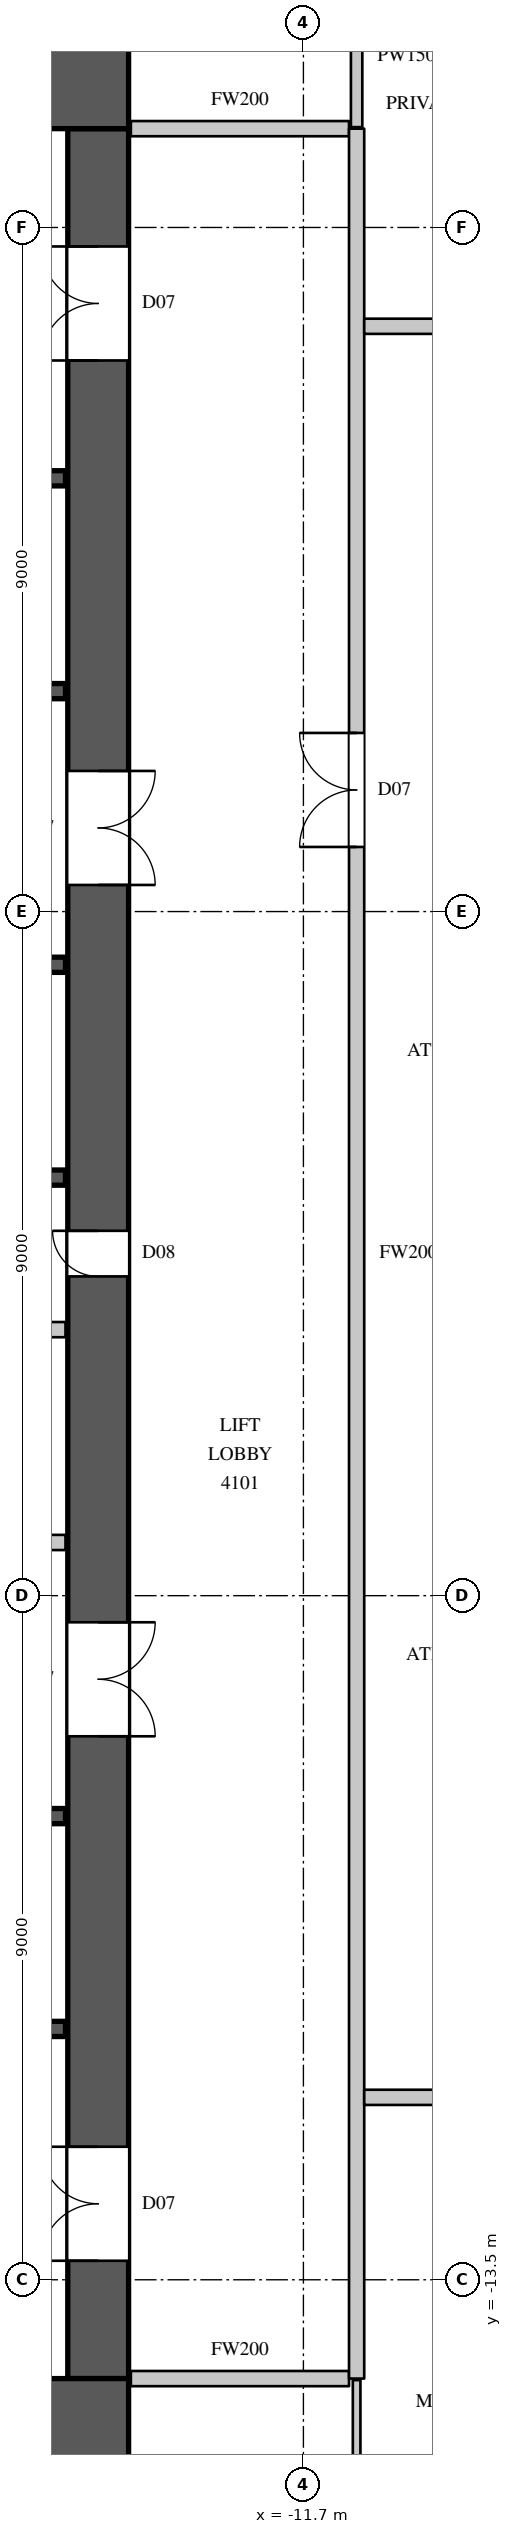
"""IFC4 building model, lengths in metres.
Left out: names, types, materials, properties, quantities, classifications, styles, units other than length and angle.
Written with IfcOpenShell. Run it as: python <this file> out.ifc"""

import sys

from ifc_helpers import new_model, si_unit, direction, frame, frame_2d, origin, place, context, subcontext, project, spatial, rectangle, extrude, element, fill, save


model = new_model("IFC4")
c1 = context("Model", 3, precision=1e-05, world=origin(), true_north=direction((0.0, 1.0)))
c2 = subcontext(c1, "Body", "Model", "MODEL_VIEW")
j1 = project(units=[si_unit("LENGTHUNIT", "METRE"), si_unit("PLANEANGLEUNIT", "RADIAN")], contexts=[c1])
p1 = place(None, origin())
s1 = spatial("IfcSite", under=j1, at=p1, CompositionType="ELEMENT")
p2 = place(p1, origin())
s2 = spatial("IfcBuilding", under=s1, at=p2, CompositionType="ELEMENT")
p3 = place(p2, frame((0.0, 0.0, 189.2)))
s3 = spatial("IfcBuildingStorey", under=s2, at=p3, CompositionType="ELEMENT", Elevation=189.2)
for number, where, z_axis, x_axis in (
    (1, (-30.0, 15.4, 0.0), (0.0, 0.0, 1.0), (1.0, 0.0, 0.0)),
    (2, (-30.0, -15.4, 0.0), (0.0, 0.0, 1.0), (1.0, 0.0, 0.0)),
):
    element("IfcWall", number, at=place(p3, frame(where, z_axis=z_axis, x_axis=x_axis)), inside=s3, PredefinedType="SHEAR", context=c2, shape_type="SweptSolid", body=[
        extrude(rectangle(XDim=16.0, YDim=1.2, at=frame_2d((8.0, 0.0))), origin(), (0.0, 0.0, 1.0), 4.1),
    ])
p4 = place(p3, frame((-14.4, -14.8, 0.0), z_axis=(0.0, 0.0, 1.0), x_axis=(0.0, 1.0, 0.0)))
e3 = element("IfcWall", 3, at=p4, inside=s3, PredefinedType="SHEAR", context=c2, shape_type="SweptSolid", body=[
    extrude(rectangle(XDim=29.6, YDim=0.8, at=frame_2d((14.8, 0.0))), origin(), (0.0, 0.0, 1.0), 4.1),
])
p5 = place(p4, frame((1.55, 0.0, 0.0)))
e4 = element("IfcOpeningElement", 4, at=p5, cuts=e3, PredefinedType="OPENING", context=c2, shape_type="SweptSolid", body=[
    extrude(rectangle(XDim=1.5, YDim=2.4, at=frame_2d((0.75, 1.2))), frame((0.0, 0.41, 0.0), z_axis=(0.0, -1.0, 0.0), x_axis=(1.0, 0.0, 0.0)), (0.0, 0.0, 1.0), 0.82),
])
p6 = place(p4, frame((26.55, 0.0, 0.0)))
e5 = element("IfcOpeningElement", 5, at=p6, cuts=e3, PredefinedType="OPENING", context=c2, shape_type="SweptSolid", body=[
    extrude(rectangle(XDim=1.5, YDim=2.4, at=frame_2d((0.75, 1.2))), frame((0.0, 0.41, 0.0), z_axis=(0.0, -1.0, 0.0), x_axis=(1.0, 0.0, 0.0)), (0.0, 0.0, 1.0), 0.82),
])
p7 = place(p4, frame((8.45, 0.0, 0.0)))
e6 = element("IfcOpeningElement", 6, at=p7, cuts=e3, PredefinedType="OPENING", context=c2, shape_type="SweptSolid", body=[
    extrude(rectangle(XDim=1.5, YDim=2.4, at=frame_2d((0.75, 1.2))), frame((0.0, 0.41, 0.0), z_axis=(0.0, -1.0, 0.0), x_axis=(1.0, 0.0, 0.0)), (0.0, 0.0, 1.0), 0.82),
])
p8 = place(p4, frame((19.65, 0.0, 0.0)))
e7 = element("IfcOpeningElement", 7, at=p8, cuts=e3, PredefinedType="OPENING", context=c2, shape_type="SweptSolid", body=[
    extrude(rectangle(XDim=1.5, YDim=2.4, at=frame_2d((0.75, 1.2))), frame((0.0, 0.41, 0.0), z_axis=(0.0, -1.0, 0.0), x_axis=(1.0, 0.0, 0.0)), (0.0, 0.0, 1.0), 0.82),
])
p9 = place(p4, frame((14.5, 0.0, 0.0)))
e8 = element("IfcOpeningElement", 8, at=p9, cuts=e3, PredefinedType="OPENING", context=c2, shape_type="SweptSolid", body=[
    extrude(rectangle(XDim=0.6, YDim=2.0, at=frame_2d((0.3, 1.0))), frame((0.0, 0.41, 0.0), z_axis=(0.0, -1.0, 0.0), x_axis=(1.0, 0.0, 0.0)), (0.0, 0.0, 1.0), 0.82),
])
p10 = place(p3, frame((-23.02, -3.8, 0.0), z_axis=(0.0, 0.0, 1.0), x_axis=(1.0, 0.0, 0.0)))
e9 = element("IfcWall", 9, at=p10, inside=s3, PredefinedType="PARTITIONING", context=c2, shape_type="SweptSolid", body=[
    extrude(rectangle(XDim=8.19, YDim=0.2, at=frame_2d((4.095, 0.0))), origin(), (0.0, 0.0, 1.0), 3.8),
])
p11 = place(p10, frame((1.5, 0.0, 0.0)))
e10 = element("IfcOpeningElement", 10, at=p11, cuts=e9, PredefinedType="OPENING", context=c2, shape_type="SweptSolid", body=[
    extrude(rectangle(XDim=0.9, YDim=2.2, at=frame_2d((0.45, 1.1))), frame((0.0, 0.11, 0.0), z_axis=(0.0, -1.0, 0.0), x_axis=(1.0, 0.0, 0.0)), (0.0, 0.0, 1.0), 0.22),
])
p12 = place(p10, frame((5.45, 0.0, 0.0)))
e11 = element("IfcOpeningElement", 11, at=p12, cuts=e9, PredefinedType="OPENING", context=c2, shape_type="SweptSolid", body=[
    extrude(rectangle(XDim=0.9, YDim=2.2, at=frame_2d((0.45, 1.1))), frame((0.0, 0.11, 0.0), z_axis=(0.0, -1.0, 0.0), x_axis=(1.0, 0.0, 0.0)), (0.0, 0.0, 1.0), 0.22),
])
for number, where, z_axis, x_axis in (
    (12, (-13.97, -14.8, 0.0), (0.0, 0.0, 1.0), (1.0, 0.0, 0.0)),
    (13, (-13.97, 14.8, 0.0), (0.0, 0.0, 1.0), (1.0, 0.0, 0.0)),
):
    element("IfcWall", number, at=place(p3, frame(where, z_axis=z_axis, x_axis=x_axis)), inside=s3, PredefinedType="PARTITIONING", context=c2, shape_type="SweptSolid", body=[
        extrude(rectangle(XDim=2.87, YDim=0.2, at=frame_2d((1.435, 0.0))), origin(), (0.0, 0.0, 1.0), 3.8),
    ])
p13 = place(p3, frame((-11.0, -14.8, 0.0), z_axis=(0.0, 0.0, 1.0), x_axis=(0.0, 1.0, 0.0)))
e14 = element("IfcWall", 14, at=p13, inside=s3, PredefinedType="PARTITIONING", context=c2, shape_type="SweptSolid", body=[
    extrude(rectangle(XDim=29.6, YDim=0.2, at=frame_2d((14.8, 0.0))), origin(), (0.0, 0.0, 1.0), 3.8),
])
p14 = place(p13, frame((20.15, 0.0, 0.0)))
e15 = element("IfcOpeningElement", 15, at=p14, cuts=e14, PredefinedType="OPENING", context=c2, shape_type="SweptSolid", body=[
    extrude(rectangle(XDim=1.5, YDim=2.4, at=frame_2d((0.75, 1.2))), frame((0.0, 0.11, 0.0), z_axis=(0.0, -1.0, 0.0), x_axis=(1.0, 0.0, 0.0)), (0.0, 0.0, 1.0), 0.22),
])
p15 = place(p3, frame((-10.9, -11.1, 0.0), z_axis=(0.0, 0.0, 1.0), x_axis=(1.0, 0.0, 0.0)))
e16 = element("IfcWall", 16, at=p15, inside=s3, PredefinedType="PARTITIONING", context=c2, shape_type="SweptSolid", body=[
    extrude(rectangle(XDim=20.9, YDim=0.2, at=frame_2d((10.45, 0.0))), origin(), (0.0, 0.0, 1.0), 3.8),
])
p16 = place(p15, frame((1.1, 0.0, 0.0)))
e17 = element("IfcOpeningElement", 17, at=p16, cuts=e16, PredefinedType="OPENING", context=c2, shape_type="SweptSolid", body=[
    extrude(rectangle(XDim=0.9, YDim=2.2, at=frame_2d((0.45, 1.1))), frame((0.0, 0.11, 0.0), z_axis=(0.0, -1.0, 0.0), x_axis=(1.0, 0.0, 0.0)), (0.0, 0.0, 1.0), 0.22),
])
p17 = place(p15, frame((4.9, 0.0, 0.0)))
e18 = element("IfcOpeningElement", 18, at=p17, cuts=e16, PredefinedType="OPENING", context=c2, shape_type="SweptSolid", body=[
    extrude(rectangle(XDim=0.9, YDim=2.2, at=frame_2d((0.45, 1.1))), frame((0.0, 0.11, 0.0), z_axis=(0.0, -1.0, 0.0), x_axis=(1.0, 0.0, 0.0)), (0.0, 0.0, 1.0), 0.22),
])
p18 = place(p15, frame((7.25, 0.0, 0.0)))
e19 = element("IfcOpeningElement", 19, at=p18, cuts=e16, PredefinedType="OPENING", context=c2, shape_type="SweptSolid", body=[
    extrude(rectangle(XDim=0.9, YDim=2.2, at=frame_2d((0.45, 1.1))), frame((0.0, 0.11, 0.0), z_axis=(0.0, -1.0, 0.0), x_axis=(1.0, 0.0, 0.0)), (0.0, 0.0, 1.0), 0.22),
])
p19 = place(p15, frame((9.95, 0.0, 0.0)))
e20 = element("IfcOpeningElement", 20, at=p19, cuts=e16, PredefinedType="OPENING", context=c2, shape_type="SweptSolid", body=[
    extrude(rectangle(XDim=1.1, YDim=2.4, at=frame_2d((0.55, 1.2))), frame((0.0, 0.11, 0.0), z_axis=(0.0, -1.0, 0.0), x_axis=(1.0, 0.0, 0.0)), (0.0, 0.0, 1.0), 0.22),
])
p20 = place(p15, frame((16.3, 0.0, 0.0)))
e21 = element("IfcOpeningElement", 21, at=p20, cuts=e16, PredefinedType="OPENING", context=c2, shape_type="SweptSolid", body=[
    extrude(rectangle(XDim=1.1, YDim=2.4, at=frame_2d((0.55, 1.2))), frame((0.0, 0.11, 0.0), z_axis=(0.0, -1.0, 0.0), x_axis=(1.0, 0.0, 0.0)), (0.0, 0.0, 1.0), 0.22),
])
p21 = place(p3, frame((-10.9, 12.2, 0.0), z_axis=(0.0, 0.0, 1.0), x_axis=(1.0, 0.0, 0.0)))
e22 = element("IfcWall", 22, at=p21, inside=s3, PredefinedType="PARTITIONING", context=c2, shape_type="SweptSolid", body=[
    extrude(rectangle(XDim=3.704, YDim=0.2, at=frame_2d((1.852, 0.0))), origin(), (0.0, 0.0, 1.0), 3.8),
])
p22 = place(p21, frame((1.7, 0.0, 0.0)))
e23 = element("IfcOpeningElement", 23, at=p22, cuts=e22, PredefinedType="OPENING", context=c2, shape_type="SweptSolid", body=[
    extrude(rectangle(XDim=1.1, YDim=2.4, at=frame_2d((0.55, 1.2))), frame((0.0, 0.11, 0.0), z_axis=(0.0, -1.0, 0.0), x_axis=(1.0, 0.0, 0.0)), (0.0, 0.0, 1.0), 0.22),
])
p23 = place(p3, frame((-11.0, 14.82, 0.0), z_axis=(0.0, 0.0, 1.0), x_axis=(0.0, 1.0, 0.0)))
e24 = element("IfcWall", 24, at=p23, inside=s3, PredefinedType="PARTITIONING", context=c2, shape_type="SweptSolid", body=[
    extrude(rectangle(XDim=1.88, YDim=0.15, at=frame_2d((0.94, 0.0))), origin(), (0.0, 0.0, 1.0), 3.8),
])
p24 = place(p3, frame((-29.17, -1.0, 0.0), z_axis=(0.0, 0.0, 1.0), x_axis=(1.0, 0.0, 0.0)))
e25 = element("IfcWall", 25, at=p24, inside=s3, PredefinedType="PARTITIONING", context=c2, shape_type="SweptSolid", body=[
    extrude(rectangle(XDim=14.34, YDim=0.2, at=frame_2d((7.17, 0.0))), origin(), (0.0, 0.0, 1.0), 3.8),
])
p25 = place(p3, frame((-26.08, 1.0, 0.0), z_axis=(0.0, 0.0, 1.0), x_axis=(1.0, 0.0, 0.0)))
e26 = element("IfcWall", 26, at=p25, inside=s3, PredefinedType="SHEAR", context=c2, shape_type="SweptSolid", body=[
    extrude(rectangle(XDim=11.25, YDim=0.2, at=frame_2d((5.625, 0.0))), origin(), (0.0, 0.0, 1.0), 3.8),
])
p26 = place(p3, frame((-26.08, 3.8, 0.0), z_axis=(0.0, 0.0, 1.0), x_axis=(1.0, 0.0, 0.0)))
e27 = element("IfcWall", 27, at=p26, inside=s3, PredefinedType="SHEAR", context=c2, shape_type="SweptSolid", body=[
    extrude(rectangle(XDim=11.25, YDim=0.2, at=frame_2d((5.625, 0.0))), origin(), (0.0, 0.0, 1.0), 3.8),
])
p27 = place(p26, frame((0.8, 0.0, 0.0)))
e28 = element("IfcOpeningElement", 28, at=p27, cuts=e27, PredefinedType="OPENING", context=c2, shape_type="SweptSolid", body=[
    extrude(rectangle(XDim=1.1, YDim=2.2, at=frame_2d((0.55, 1.1))), frame((0.0, 0.11, 0.0), z_axis=(0.0, -1.0, 0.0), x_axis=(1.0, 0.0, 0.0)), (0.0, 0.0, 1.0), 0.22),
])
p28 = place(p26, frame((3.55, 0.0, 0.0)))
e29 = element("IfcOpeningElement", 29, at=p28, cuts=e27, PredefinedType="OPENING", context=c2, shape_type="SweptSolid", body=[
    extrude(rectangle(XDim=1.1, YDim=2.2, at=frame_2d((0.55, 1.1))), frame((0.0, 0.11, 0.0), z_axis=(0.0, -1.0, 0.0), x_axis=(1.0, 0.0, 0.0)), (0.0, 0.0, 1.0), 0.22),
])
p29 = place(p26, frame((6.25, 0.0, 0.0)))
e30 = element("IfcOpeningElement", 30, at=p29, cuts=e27, PredefinedType="OPENING", context=c2, shape_type="SweptSolid", body=[
    extrude(rectangle(XDim=1.1, YDim=2.2, at=frame_2d((0.55, 1.1))), frame((0.0, 0.11, 0.0), z_axis=(0.0, -1.0, 0.0), x_axis=(1.0, 0.0, 0.0)), (0.0, 0.0, 1.0), 0.22),
])
p30 = place(p26, frame((9.15, 0.0, 0.0)))
e31 = element("IfcOpeningElement", 31, at=p30, cuts=e27, PredefinedType="OPENING", context=c2, shape_type="SweptSolid", body=[
    extrude(rectangle(XDim=1.1, YDim=2.2, at=frame_2d((0.55, 1.1))), frame((0.0, 0.11, 0.0), z_axis=(0.0, -1.0, 0.0), x_axis=(1.0, 0.0, 0.0)), (0.0, 0.0, 1.0), 0.22),
])
p31 = place(p3, frame((-17.92, -10.2, 0.0), z_axis=(0.0, 0.0, 1.0), x_axis=(1.0, 0.0, 0.0)))
e32 = element("IfcWall", 32, at=p31, inside=s3, PredefinedType="SHEAR", context=c2, shape_type="SweptSolid", body=[
    extrude(rectangle(XDim=3.09, YDim=0.2, at=frame_2d((1.545, 0.0))), origin(), (0.0, 0.0, 1.0), 3.8),
])
p32 = place(p31, frame((1.0, 0.0, 0.0)))
e33 = element("IfcOpeningElement", 33, at=p32, cuts=e32, PredefinedType="OPENING", context=c2, shape_type="SweptSolid", body=[
    extrude(rectangle(XDim=1.1, YDim=2.2, at=frame_2d((0.55, 1.1))), frame((0.0, 0.11, 0.0), z_axis=(0.0, -1.0, 0.0), x_axis=(1.0, 0.0, 0.0)), (0.0, 0.0, 1.0), 0.22),
])
p33 = place(p3, frame((-17.9, -7.4, 0.0), z_axis=(0.0, 0.0, 1.0), x_axis=(1.0, 0.0, 0.0)))
e34 = element("IfcWall", 34, at=p33, inside=s3, PredefinedType="SHEAR", context=c2, shape_type="SweptSolid", body=[
    extrude(rectangle(XDim=3.07, YDim=0.2, at=frame_2d((1.535, 0.0))), origin(), (0.0, 0.0, 1.0), 3.8),
])
p34 = place(p3, frame((-17.92, 7.4, 0.0), z_axis=(0.0, 0.0, 1.0), x_axis=(1.0, 0.0, 0.0)))
e35 = element("IfcWall", 35, at=p34, inside=s3, PredefinedType="SHEAR", context=c2, shape_type="SweptSolid", body=[
    extrude(rectangle(XDim=3.09, YDim=0.2, at=frame_2d((1.545, 0.0))), origin(), (0.0, 0.0, 1.0), 3.8),
])
p35 = place(p3, frame((-17.92, 10.2, 0.0), z_axis=(0.0, 0.0, 1.0), x_axis=(1.0, 0.0, 0.0)))
e36 = element("IfcWall", 36, at=p35, inside=s3, PredefinedType="SHEAR", context=c2, shape_type="SweptSolid", body=[
    extrude(rectangle(XDim=3.09, YDim=0.2, at=frame_2d((1.545, 0.0))), origin(), (0.0, 0.0, 1.0), 3.8),
])
p36 = place(p35, frame((1.0, 0.0, 0.0)))
e37 = element("IfcOpeningElement", 37, at=p36, cuts=e36, PredefinedType="OPENING", context=c2, shape_type="SweptSolid", body=[
    extrude(rectangle(XDim=1.1, YDim=2.2, at=frame_2d((0.55, 1.1))), frame((0.0, 0.11, 0.0), z_axis=(0.0, -1.0, 0.0), x_axis=(1.0, 0.0, 0.0)), (0.0, 0.0, 1.0), 0.22),
])
p37 = place(p3, frame((-11.0, -16.7, 0.0), z_axis=(0.0, 0.0, 1.0), x_axis=(0.0, 1.0, 0.0)))
e38 = element("IfcWall", 38, at=p37, inside=s3, PredefinedType="PARTITIONING", context=c2, shape_type="SweptSolid", body=[
    extrude(rectangle(XDim=1.88, YDim=0.1, at=frame_2d((0.94, 0.0))), origin(), (0.0, 0.0, 1.0), 3.8),
])
p38 = place(p14, origin())
e39 = element("IfcDoor", 39, at=p38, inside=s3, OperationType="DOUBLE_DOOR_SINGLE_SWING", PredefinedType="DOOR", context=c2, shape_type="SweptSolid", body=[
    extrude(rectangle(XDim=1.5, YDim=2.4, at=frame_2d((0.75, 1.2))), frame((0.0, 0.025, 0.0), z_axis=(0.0, -1.0, 0.0), x_axis=(1.0, 0.0, 0.0)), (0.0, 0.0, 1.0), 0.05),
])
fill(e15, e39)
p39 = place(p5, origin())
e40 = element("IfcDoor", 40, at=p39, inside=s3, OperationType="DOUBLE_DOOR_SINGLE_SWING", PredefinedType="DOOR", context=c2, shape_type="SweptSolid", body=[
    extrude(rectangle(XDim=1.5, YDim=2.4, at=frame_2d((0.75, 1.2))), frame((0.0, 0.395, 0.0), z_axis=(0.0, -1.0, 0.0), x_axis=(1.0, 0.0, 0.0)), (0.0, 0.0, 1.0), 0.05),
])
fill(e4, e40)
p40 = place(p6, origin())
e41 = element("IfcDoor", 41, at=p40, inside=s3, OperationType="DOUBLE_DOOR_SINGLE_SWING", PredefinedType="DOOR", context=c2, shape_type="SweptSolid", body=[
    extrude(rectangle(XDim=1.5, YDim=2.4, at=frame_2d((0.75, 1.2))), frame((0.0, 0.395, 0.0), z_axis=(0.0, -1.0, 0.0), x_axis=(1.0, 0.0, 0.0)), (0.0, 0.0, 1.0), 0.05),
])
fill(e5, e41)
p41 = place(p7, origin())
e42 = element("IfcDoor", 42, at=p41, inside=s3, OperationType="DOUBLE_DOOR_SINGLE_SWING", PredefinedType="DOOR", context=c2, shape_type="SweptSolid", body=[
    extrude(rectangle(XDim=1.5, YDim=2.4, at=frame_2d((0.75, 1.2))), frame((0.0, -0.345, 0.0), z_axis=(0.0, -1.0, 0.0), x_axis=(1.0, 0.0, 0.0)), (0.0, 0.0, 1.0), 0.05),
])
fill(e6, e42)
p42 = place(p8, origin())
e43 = element("IfcDoor", 43, at=p42, inside=s3, OperationType="DOUBLE_DOOR_SINGLE_SWING", PredefinedType="DOOR", context=c2, shape_type="SweptSolid", body=[
    extrude(rectangle(XDim=1.5, YDim=2.4, at=frame_2d((0.75, 1.2))), frame((0.0, -0.345, 0.0), z_axis=(0.0, -1.0, 0.0), x_axis=(1.0, 0.0, 0.0)), (0.0, 0.0, 1.0), 0.05),
])
fill(e7, e43)
p43 = place(p9, origin())
e44 = element("IfcDoor", 44, at=p43, inside=s3, OperationType="SINGLE_SWING_RIGHT", PredefinedType="DOOR", context=c2, shape_type="SweptSolid", body=[
    extrude(rectangle(XDim=0.6, YDim=2.0, at=frame_2d((0.3, 1.0))), frame((0.0, 0.395, 0.0), z_axis=(0.0, -1.0, 0.0), x_axis=(1.0, 0.0, 0.0)), (0.0, 0.0, 1.0), 0.05),
])
fill(e8, e44)
save(model, sys.argv[1])
